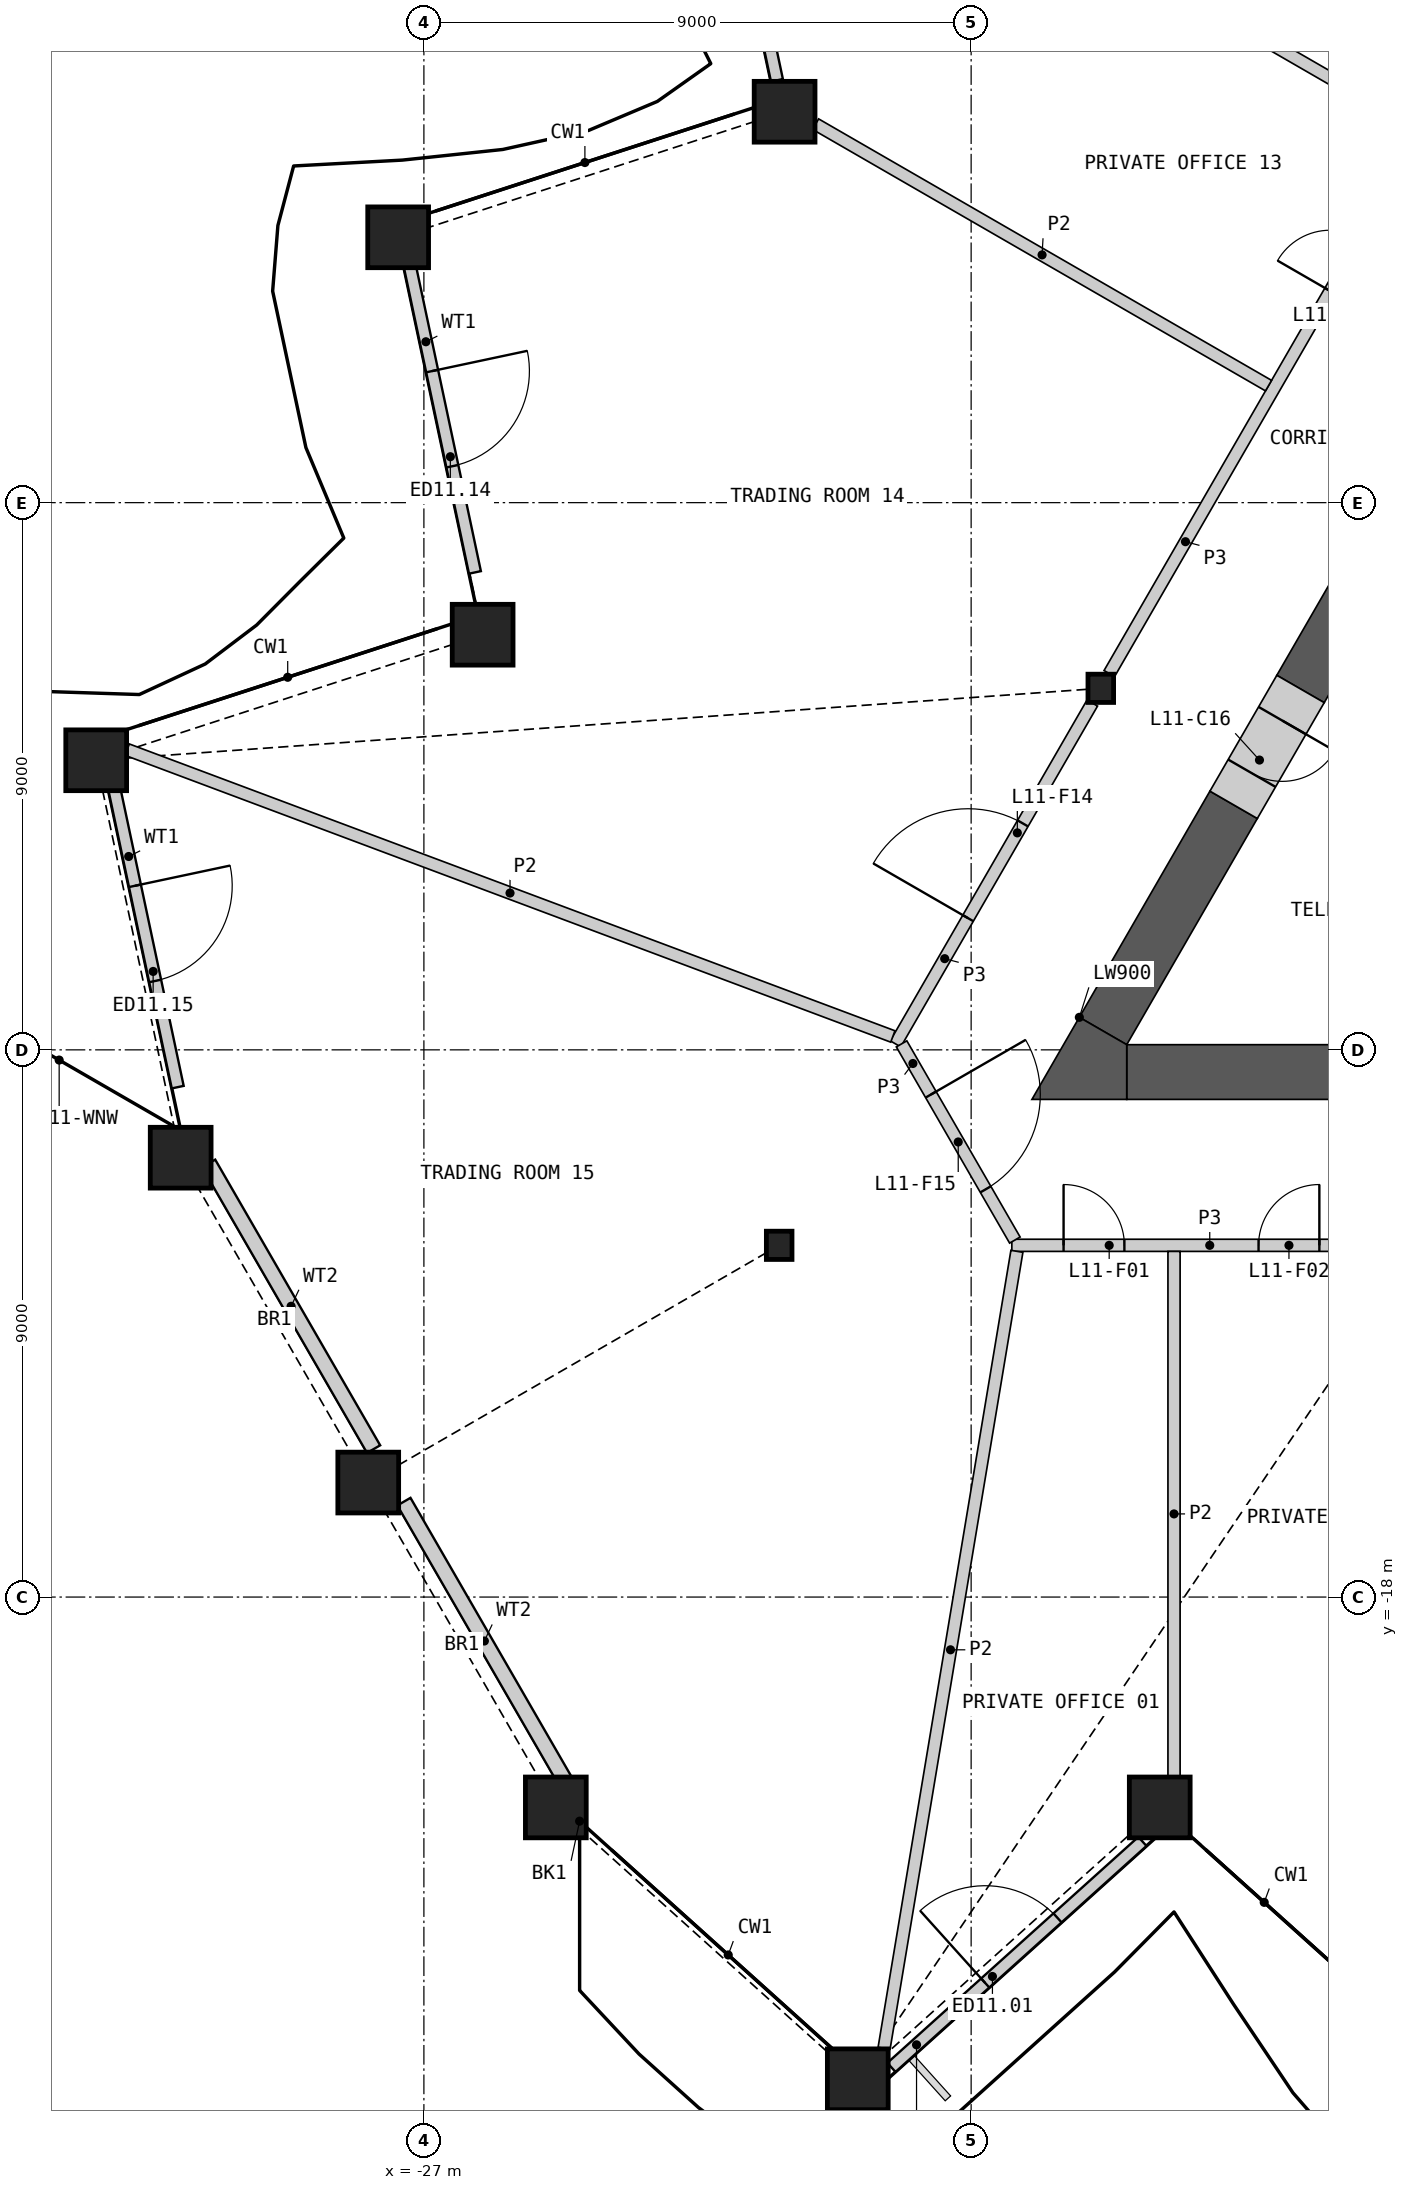
"""IFC4 building model, lengths in metres.
Left out: names, types, materials, properties, quantities, classifications, styles, units other than length and angle.
Written with IfcOpenShell. Run it as: python <this file> out.ifc"""

import sys

from ifc_helpers import new_model, si_unit, direction, frame, frame_2d, origin, origin_2d, place, context, subcontext, project, spatial, polyline, rectangle, hollow_rectangle, i_section, outline, extrude, element, fill, save


model = new_model("IFC4")
c1 = context("Model", 3, precision=1e-05, world=origin(), true_north=direction((0.0, 1.0)))
c2 = subcontext(c1, "Body", "Model", "MODEL_VIEW")
j1 = project(units=[si_unit("LENGTHUNIT", "METRE"), si_unit("PLANEANGLEUNIT", "RADIAN")], contexts=[c1])
p1 = place(None, origin())
s1 = spatial("IfcSite", under=j1, at=p1, CompositionType="ELEMENT")
p2 = place(p1, origin())
s2 = spatial("IfcBuilding", under=s1, at=p2, CompositionType="ELEMENT")
p3 = place(p2, frame((0.0, 0.0, 55.2)))
s3 = spatial("IfcBuildingStorey", under=s2, at=p3, CompositionType="ELEMENT", Elevation=55.2)
for number, where, z_axis, x_axis in (
    (1, (-24.83, -21.46, 0.0), (0.0, 0.0, 1.0), (1.0, 0.0, 0.0)),
    (2, (-19.864, -25.931, 0.0), (0.0, 0.0, 1.0), (1.0, 0.0, 0.0)),
    (3, (-14.898, -21.46, 0.0), (0.0, 0.0, 1.0), (1.0, 0.0, 0.0)),
    (4, (-21.068, 6.429, 0.0), (0.0, 0.0, 1.0), (1.0, 0.0, 0.0)),
    (5, (-27.423, 4.364, 0.0), (0.0, 0.0, 1.0), (1.0, 0.0, 0.0)),
    (6, (-26.034, -2.172, 0.0), (0.0, 0.0, 1.0), (1.0, 0.0, 0.0)),
    (7, (-32.389, -4.237, 0.0), (0.0, 0.0, 1.0), (1.0, 0.0, 0.0)),
    (8, (-31.0, -10.774, 0.0), (0.0, 0.0, 1.0), (1.0, 0.0, 0.0)),
    (9, (-27.915, -16.117, 0.0), (0.0, 0.0, 1.0), (1.0, 0.0, 0.0)),
):
    element("IfcColumn", number, at=place(p3, frame(where, z_axis=z_axis, x_axis=x_axis)), inside=s3, PredefinedType="COLUMN", context=c2, shape_type="SweptSolid", body=[
        extrude(hollow_rectangle(XDim=1.0, YDim=1.0, WallThickness=0.07, at=origin_2d()), origin(), (0.0, 0.0, 1.0), 4.2),
    ])
for number, where, z_axis, x_axis in (
    (10, (-15.868, -3.054, 0.0), (0.0, 0.0, 1.0), (1.0, 0.0, 0.0)),
    (11, (-21.157, -12.215, 0.0), (0.0, 0.0, 1.0), (1.0, 0.0, 0.0)),
):
    element("IfcColumn", number, at=place(p3, frame(where, z_axis=z_axis, x_axis=x_axis)), inside=s3, PredefinedType="COLUMN", context=c2, shape_type="SweptSolid", body=[
        extrude(i_section(OverallWidth=0.421, OverallDepth=0.465, WebThickness=0.045, FlangeThickness=0.072, at=origin_2d()), origin(), (0.0, 0.0, 1.0), 4.2),
    ])
p4 = place(p3, frame((-19.311, -25.736, 0.0), z_axis=(0.0, 0.0, 1.0), x_axis=(0.743147692621, 0.66912742206, 0.0)))
e12 = element("IfcWall", 12, at=p4, inside=s3, PredefinedType="SOLIDWALL", context=c2, shape_type="SweptSolid", body=[
    extrude(rectangle(XDim=5.554, YDim=0.2, at=frame_2d((2.777, 0.0))), origin(), (0.0, 0.0, 1.0), 3.189),
])
p5 = place(p4, frame((2.075, 0.0, 0.0)))
e13 = element("IfcOpeningElement", 13, at=p5, cuts=e12, PredefinedType="OPENING", context=c2, shape_type="SweptSolid", body=[
    extrude(rectangle(XDim=1.6, YDim=2.4, at=frame_2d((0.8, 1.2))), frame((0.0, 0.11, 0.0), z_axis=(0.0, -1.0, 0.0), x_axis=(1.0, 0.0, 0.0)), (0.0, 0.0, 1.0), 0.22),
])
p6 = place(p3, frame((-22.363, 12.449, 0.0), z_axis=(0.0, 0.0, 1.0), x_axis=(0.207901831982, -0.978149696242, 0.0)))
e14 = element("IfcWall", 14, at=p6, inside=s3, PredefinedType="SOLIDWALL", context=c2, shape_type="SweptSolid", body=[
    extrude(rectangle(XDim=5.626, YDim=0.2, at=frame_2d((2.813, 0.0))), origin(), (0.0, 0.0, 1.0), 3.189),
])
p7 = place(p6, frame((1.86, 0.0, 0.0)))
e15 = element("IfcOpeningElement", 15, at=p7, cuts=e14, PredefinedType="OPENING", context=c2, shape_type="SweptSolid", body=[
    extrude(rectangle(XDim=1.6, YDim=2.4, at=frame_2d((0.8, 1.2))), frame((0.0, 0.11, 0.0), z_axis=(0.0, -1.0, 0.0), x_axis=(1.0, 0.0, 0.0)), (0.0, 0.0, 1.0), 0.22),
])
p8 = place(p3, frame((-27.236, 3.911, 0.0), z_axis=(0.0, 0.0, 1.0), x_axis=(0.207877954287, -0.978154771047, 0.0)))
e16 = element("IfcWall", 16, at=p8, inside=s3, PredefinedType="SOLIDWALL", context=c2, shape_type="SweptSolid", body=[
    extrude(rectangle(XDim=5.171, YDim=0.2, at=frame_2d((2.585, 0.0))), origin(), (0.0, 0.0, 1.0), 3.189),
])
p9 = place(p8, frame((1.786, 0.0, 0.0)))
e17 = element("IfcOpeningElement", 17, at=p9, cuts=e16, PredefinedType="OPENING", context=c2, shape_type="SweptSolid", body=[
    extrude(rectangle(XDim=1.6, YDim=2.4, at=frame_2d((0.8, 1.2))), frame((0.0, 0.11, 0.0), z_axis=(0.0, -1.0, 0.0), x_axis=(1.0, 0.0, 0.0)), (0.0, 0.0, 1.0), 0.22),
])
p10 = place(p3, frame((-32.124, -4.555, 0.0), z_axis=(0.0, 0.0, 1.0), x_axis=(0.207923126203, -0.978145169998, 0.0)))
e18 = element("IfcWall", 18, at=p10, inside=s3, PredefinedType="SOLIDWALL", context=c2, shape_type="SweptSolid", body=[
    extrude(rectangle(XDim=5.171, YDim=0.2, at=frame_2d((2.585, 0.0))), origin(), (0.0, 0.0, 1.0), 3.189),
])
p11 = place(p10, frame((1.786, 0.0, 0.0)))
e19 = element("IfcOpeningElement", 19, at=p11, cuts=e18, PredefinedType="OPENING", context=c2, shape_type="SweptSolid", body=[
    extrude(rectangle(XDim=1.6, YDim=2.4, at=frame_2d((0.8, 1.2))), frame((0.0, 0.11, 0.0), z_axis=(0.0, -1.0, 0.0), x_axis=(1.0, 0.0, 0.0)), (0.0, 0.0, 1.0), 0.22),
])
p12 = place(p3, frame((-30.54, -10.868, 0.0), z_axis=(0.0, 0.0, 1.0), x_axis=(0.499991204533, -0.86603048179, 0.0)))
e20 = element("IfcWall", 20, at=p12, inside=s3, PredefinedType="SOLIDWALL", context=c2, shape_type="SweptSolid", body=[
    extrude(rectangle(XDim=5.426, YDim=0.25, at=frame_2d((2.713, 0.0))), origin(), (0.0, 0.0, 1.0), 3.189),
])
p13 = place(p3, frame((-27.329, -16.431, 0.0), z_axis=(0.0, 0.0, 1.0), x_axis=(0.500008603535, -0.866020436474, 0.0)))
e21 = element("IfcWall", 21, at=p13, inside=s3, PredefinedType="SOLIDWALL", context=c2, shape_type="SweptSolid", body=[
    extrude(rectangle(XDim=5.293, YDim=0.25, at=frame_2d((2.646, 0.0))), origin(), (0.0, 0.0, 1.0), 3.189),
])
p14 = place(p3, frame((-15.441, -9.365, 0.0), z_axis=(0.0, 0.0, 1.0), x_axis=(1.0, 0.0, 0.0)))
e22 = element("IfcWall", 22, at=p14, inside=s3, PredefinedType="SHEAR", context=c2, shape_type="SweptSolid", body=[
    extrude(rectangle(XDim=14.341, YDim=0.9, at=frame_2d((7.17, 0.0))), origin(), (0.0, 0.0, 1.0), 3.8),
])
p15 = place(p3, frame((-10.31, 0.872, 0.0), z_axis=(0.0, 0.0, 1.0), x_axis=(-0.499968858743, -0.866043382451, 0.0)))
e23 = element("IfcWall", 23, at=p15, inside=s3, PredefinedType="SHEAR", context=c2, shape_type="SweptSolid", body=[
    extrude(rectangle(XDim=4.546, YDim=0.9, at=frame_2d((2.273, 0.0))), origin(), (0.0, 0.0, 1.0), 3.8),
])
p16 = place(p3, frame((-13.683, -4.97, 0.0), z_axis=(0.0, 0.0, 1.0), x_axis=(-0.499996331799, -0.866027521611, 0.0)))
e24 = element("IfcWall", 24, at=p16, inside=s3, PredefinedType="SHEAR", context=c2, shape_type="SweptSolid", body=[
    extrude(rectangle(XDim=4.295, YDim=0.9, at=frame_2d((2.148, 0.0))), origin(), (0.0, 0.0, 1.0), 3.8),
])
p17 = place(p3, origin())
e25 = element("IfcWall", 25, at=p17, inside=s3, PredefinedType="SHEAR", context=c2, shape_type="SweptSolid", body=[
    extrude(outline(polyline([(-16.221, -8.465), (-15.441, -8.915), (-15.441, -9.815), (-17.0, -9.815), (-16.221, -8.465)])), origin(), (0.0, 0.0, 1.0), 3.8),
])
p18 = place(p3, frame((-12.583, -3.065, 0.0), z_axis=(0.0, 0.0, 1.0), x_axis=(-0.50002983664, -0.866008176907, 0.0)))
e26 = element("IfcWall", 26, at=p18, inside=s3, PredefinedType="SHEAR", context=c2, shape_type="SweptSolid", body=[
    extrude(rectangle(XDim=2.2, YDim=0.9, at=frame_2d((1.1, 0.0))), origin(), (0.0, 0.0, 1.0), 3.8),
])
p19 = place(p18, frame((0.6, 0.0, 0.0)))
e27 = element("IfcOpeningElement", 27, at=p19, cuts=e26, PredefinedType="OPENING", context=c2, shape_type="SweptSolid", body=[
    extrude(rectangle(XDim=1.0, YDim=2.1, at=frame_2d((0.5, 1.05))), frame((0.0, 0.46, 0.0), z_axis=(0.0, -1.0, 0.0), x_axis=(1.0, 0.0, 0.0)), (0.0, 0.0, 1.0), 0.92),
])
p20 = place(p3, frame((-15.728, -2.811, 0.0), z_axis=(0.0, 0.0, 1.0), x_axis=(0.49999175339, 0.866030164915, 0.0)))
e28 = element("IfcWall", 28, at=p20, inside=s3, PredefinedType="PARTITIONING", context=c2, shape_type="SweptSolid", body=[
    extrude(rectangle(XDim=10.019, YDim=0.2, at=frame_2d((5.009, 0.0))), origin(), (0.0, 0.0, 1.0), 3.8),
])
p21 = place(p20, frame((7.266, 0.0, 0.0)))
e29 = element("IfcOpeningElement", 29, at=p21, cuts=e28, PredefinedType="OPENING", context=c2, shape_type="SweptSolid", body=[
    extrude(rectangle(XDim=1.0, YDim=2.1, at=frame_2d((0.5, 1.05))), frame((0.0, 0.11, 0.0), z_axis=(0.0, -1.0, 0.0), x_axis=(1.0, 0.0, 0.0)), (0.0, 0.0, 1.0), 0.22),
])
p22 = place(p3, frame((-17.331, -12.215, 0.0), z_axis=(0.0, 0.0, 1.0), x_axis=(1.0, 0.0, 0.0)))
e30 = element("IfcWall", 30, at=p22, inside=s3, PredefinedType="PARTITIONING", context=c2, shape_type="SweptSolid", body=[
    extrude(rectangle(XDim=6.51, YDim=0.2, at=frame_2d((3.255, 0.0))), origin(), (0.0, 0.0, 1.0), 3.8),
])
p23 = place(p22, frame((0.851, 0.0, 0.0)))
e31 = element("IfcOpeningElement", 31, at=p23, cuts=e30, PredefinedType="OPENING", context=c2, shape_type="SweptSolid", body=[
    extrude(rectangle(XDim=1.0, YDim=2.1, at=frame_2d((0.5, 1.05))), frame((0.0, 0.11, 0.0), z_axis=(0.0, -1.0, 0.0), x_axis=(1.0, 0.0, 0.0)), (0.0, 0.0, 1.0), 0.22),
])
p24 = place(p22, frame((4.058, 0.0, 0.0)))
e32 = element("IfcOpeningElement", 32, at=p24, cuts=e30, PredefinedType="OPENING", context=c2, shape_type="SweptSolid", body=[
    extrude(rectangle(XDim=1.0, YDim=2.1, at=frame_2d((0.5, 1.05))), frame((0.0, 0.11, 0.0), z_axis=(0.0, -1.0, 0.0), x_axis=(1.0, 0.0, 0.0)), (0.0, 0.0, 1.0), 0.22),
])
p25 = place(p3, frame((-19.244, -8.902, 0.0), z_axis=(0.0, 0.0, 1.0), x_axis=(0.499984737558, 0.86603421538, 0.0)))
e33 = element("IfcWall", 33, at=p25, inside=s3, PredefinedType="PARTITIONING", context=c2, shape_type="SweptSolid", body=[
    extrude(rectangle(XDim=6.473, YDim=0.2, at=frame_2d((3.236, 0.0))), origin(), (0.0, 0.0, 1.0), 3.8),
])
p26 = place(p25, frame((2.387, 0.0, 0.0)))
e34 = element("IfcOpeningElement", 34, at=p26, cuts=e33, PredefinedType="OPENING", context=c2, shape_type="SweptSolid", body=[
    extrude(rectangle(XDim=1.8, YDim=2.1, at=frame_2d((0.9, 1.05))), frame((0.0, 0.11, 0.0), z_axis=(0.0, -1.0, 0.0), x_axis=(1.0, 0.0, 0.0)), (0.0, 0.0, 1.0), 0.22),
])
p27 = place(p3, frame((-19.144, -8.902, 0.0), z_axis=(0.0, 0.0, 1.0), x_axis=(0.499958791762, -0.866049194065, 0.0)))
e35 = element("IfcWall", 35, at=p27, inside=s3, PredefinedType="PARTITIONING", context=c2, shape_type="SweptSolid", body=[
    extrude(rectangle(XDim=3.726, YDim=0.2, at=frame_2d((1.863, 0.0))), origin(), (0.0, 0.0, 1.0), 3.8),
])
p28 = place(p27, frame((0.963, 0.0, 0.0)))
e36 = element("IfcOpeningElement", 36, at=p28, cuts=e35, PredefinedType="OPENING", context=c2, shape_type="SweptSolid", body=[
    extrude(rectangle(XDim=1.8, YDim=2.1, at=frame_2d((0.9, 1.05))), frame((0.0, 0.11, 0.0), z_axis=(0.0, -1.0, 0.0), x_axis=(1.0, 0.0, 0.0)), (0.0, 0.0, 1.0), 0.22),
])
p29 = place(p3, frame((-31.879, -4.062, 0.0), z_axis=(0.0, 0.0, 1.0), x_axis=(0.93644254502, -0.350820979814, 0.0)))
e37 = element("IfcWall", 37, at=p29, inside=s3, PredefinedType="PARTITIONING", context=c2, shape_type="SweptSolid", body=[
    extrude(rectangle(XDim=13.447, YDim=0.2, at=frame_2d((6.723, 0.0))), origin(), (0.0, 0.0, 1.0), 2.885),
])
p30 = place(p3, frame((-19.432, -25.421, 0.0), z_axis=(0.0, 0.0, 1.0), x_axis=(0.164396008001, 0.986394420378, 0.0)))
e38 = element("IfcWall", 38, at=p30, inside=s3, PredefinedType="PARTITIONING", context=c2, shape_type="SweptSolid", body=[
    extrude(rectangle(XDim=13.289, YDim=0.2, at=frame_2d((6.644, 0.0))), origin(), (0.0, 0.0, 1.0), 2.885),
])
p31 = place(p3, frame((-21.947, 12.671, 0.0), z_axis=(0.0, 0.0, 1.0), x_axis=(0.866026729935, -0.499997703033, 0.0)))
e39 = element("IfcWall", 39, at=p31, inside=s3, PredefinedType="PARTITIONING", context=c2, shape_type="SweptSolid", body=[
    extrude(rectangle(XDim=12.848, YDim=0.2, at=frame_2d((6.424, 0.0))), origin(), (0.0, 0.0, 1.0), 2.885),
])
p32 = place(p3, frame((-14.663, -20.95, 0.0), z_axis=(0.0, 0.0, 1.0), x_axis=(0.0, 1.0, 0.0)))
e40 = element("IfcWall", 40, at=p32, inside=s3, PredefinedType="PARTITIONING", context=c2, shape_type="SweptSolid", body=[
    extrude(rectangle(XDim=8.635, YDim=0.2, at=frame_2d((4.317, 0.0))), origin(), (0.0, 0.0, 1.0), 2.885),
])
p33 = place(p3, frame((-20.558, 6.225, 0.0), z_axis=(0.0, 0.0, 1.0), x_axis=(0.866031967744, -0.499988630717, 0.0)))
e41 = element("IfcWall", 41, at=p33, inside=s3, PredefinedType="PARTITIONING", context=c2, shape_type="SweptSolid", body=[
    extrude(rectangle(XDim=8.601, YDim=0.2, at=frame_2d((4.301, 0.0))), origin(), (0.0, 0.0, 1.0), 2.885),
])
p34 = place(p5, origin())
e42 = element("IfcDoor", 42, at=p34, inside=s3, OperationType="DOUBLE_DOOR_SINGLE_SWING", PredefinedType="DOOR", context=c2, shape_type="SweptSolid", body=[
    extrude(rectangle(XDim=1.6, YDim=2.4, at=frame_2d((0.8, 1.2))), frame((0.0, 0.025, 0.0), z_axis=(0.0, -1.0, 0.0), x_axis=(1.0, 0.0, 0.0)), (0.0, 0.0, 1.0), 0.05),
])
fill(e13, e42)
p35 = place(p9, origin())
e43 = element("IfcDoor", 43, at=p35, inside=s3, OperationType="DOUBLE_DOOR_SINGLE_SWING", PredefinedType="DOOR", context=c2, shape_type="SweptSolid", body=[
    extrude(rectangle(XDim=1.6, YDim=2.4, at=frame_2d((0.8, 1.2))), frame((0.0, 0.025, 0.0), z_axis=(0.0, -1.0, 0.0), x_axis=(1.0, 0.0, 0.0)), (0.0, 0.0, 1.0), 0.05),
])
fill(e17, e43)
p36 = place(p11, origin())
e44 = element("IfcDoor", 44, at=p36, inside=s3, OperationType="DOUBLE_DOOR_SINGLE_SWING", PredefinedType="DOOR", context=c2, shape_type="SweptSolid", body=[
    extrude(rectangle(XDim=1.6, YDim=2.4, at=frame_2d((0.8, 1.2))), frame((0.0, 0.025, 0.0), z_axis=(0.0, -1.0, 0.0), x_axis=(1.0, 0.0, 0.0)), (0.0, 0.0, 1.0), 0.05),
])
fill(e19, e44)
p37 = place(p19, origin())
e45 = element("IfcDoor", 45, at=p37, inside=s3, OperationType="SINGLE_SWING_LEFT", PredefinedType="DOOR", context=c2, shape_type="SweptSolid", body=[
    extrude(rectangle(XDim=1.0, YDim=2.1, at=frame_2d((0.5, 1.05))), frame((0.0, 0.205, 0.0), z_axis=(0.0, -1.0, 0.0), x_axis=(1.0, 0.0, 0.0)), (0.0, 0.0, 1.0), 0.05),
])
fill(e27, e45)
p38 = place(p23, origin())
e46 = element("IfcDoor", 46, at=p38, inside=s3, OperationType="SINGLE_SWING_LEFT", PredefinedType="DOOR", context=c2, shape_type="SweptSolid", body=[
    extrude(rectangle(XDim=1.0, YDim=2.1, at=frame_2d((0.5, 1.05))), frame((0.0, 0.025, 0.0), z_axis=(0.0, -1.0, 0.0), x_axis=(1.0, 0.0, 0.0)), (0.0, 0.0, 1.0), 0.05),
])
fill(e31, e46)
p39 = place(p24, origin())
e47 = element("IfcDoor", 47, at=p39, inside=s3, OperationType="SINGLE_SWING_RIGHT", PredefinedType="DOOR", context=c2, shape_type="SweptSolid", body=[
    extrude(rectangle(XDim=1.0, YDim=2.1, at=frame_2d((0.5, 1.05))), frame((0.0, 0.025, 0.0), z_axis=(0.0, -1.0, 0.0), x_axis=(1.0, 0.0, 0.0)), (0.0, 0.0, 1.0), 0.05),
])
fill(e32, e47)
p40 = place(p26, origin())
e48 = element("IfcDoor", 48, at=p40, inside=s3, OperationType="DOUBLE_DOOR_SINGLE_SWING", PredefinedType="DOOR", context=c2, shape_type="SweptSolid", body=[
    extrude(rectangle(XDim=1.8, YDim=2.1, at=frame_2d((0.9, 1.05))), frame((0.0, 0.025, 0.0), z_axis=(0.0, -1.0, 0.0), x_axis=(1.0, 0.0, 0.0)), (0.0, 0.0, 1.0), 0.05),
])
fill(e34, e48)
p41 = place(p28, origin())
e49 = element("IfcDoor", 49, at=p41, inside=s3, OperationType="DOUBLE_DOOR_SINGLE_SWING", PredefinedType="DOOR", context=c2, shape_type="SweptSolid", body=[
    extrude(rectangle(XDim=1.8, YDim=2.1, at=frame_2d((0.9, 1.05))), frame((0.0, 0.025, 0.0), z_axis=(0.0, -1.0, 0.0), x_axis=(1.0, 0.0, 0.0)), (0.0, 0.0, 1.0), 0.05),
])
fill(e36, e49)
save(model, sys.argv[1])
